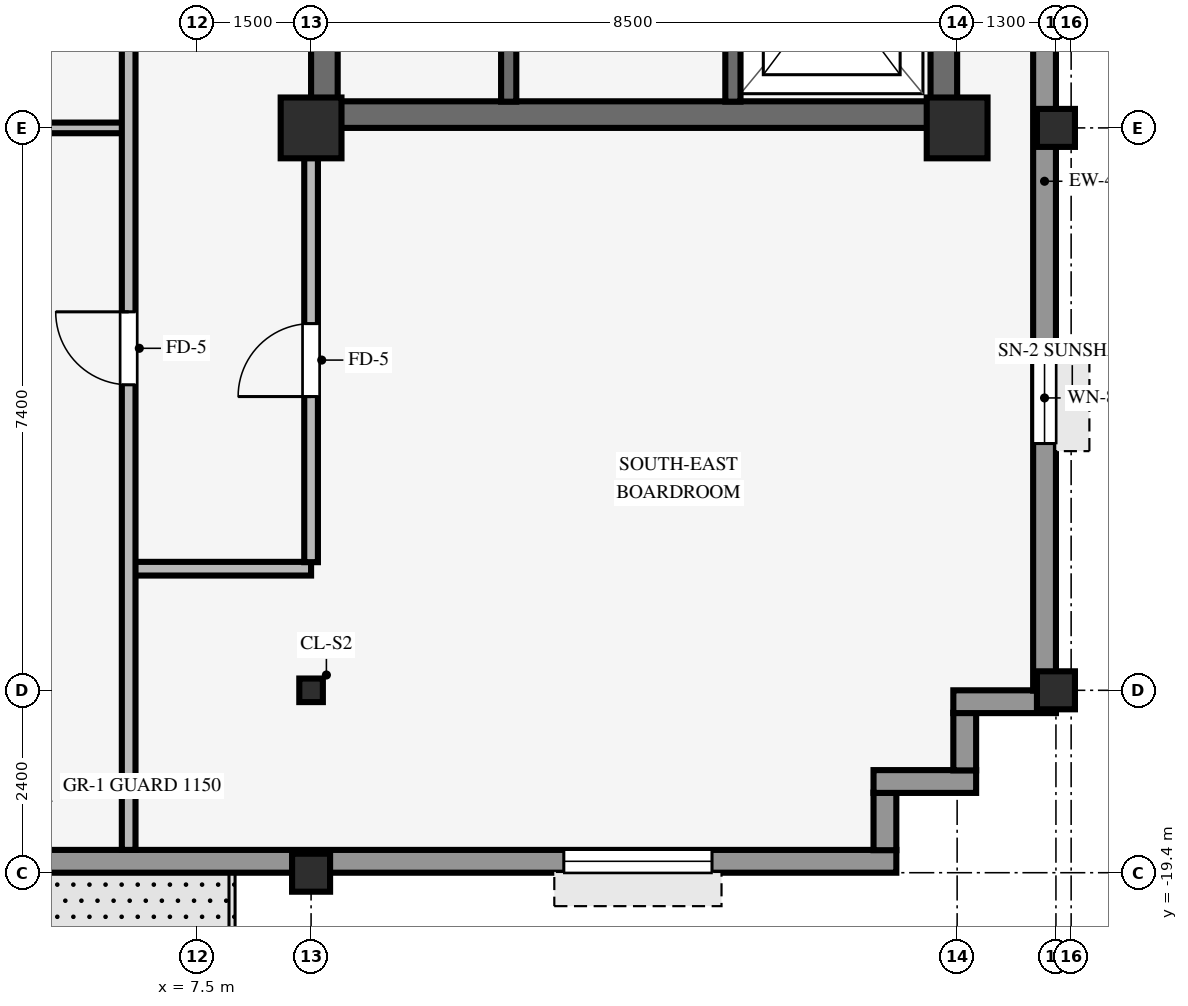
"""IFC4 building model, lengths in metres.
Left out: names, types, materials, properties, quantities, classifications, styles, units other than length and angle.
Written with IfcOpenShell. Run it as: python <this file> out.ifc"""

import sys

from ifc_helpers import new_model, si_unit, direction, frame, frame_2d, origin, origin_2d, place, context, subcontext, project, spatial, rectangle, hollow_rectangle, i_section, extrude, source, transform, mapped, element, fill, save


model = new_model("IFC4")
c1 = context("Model", 3, precision=1e-05, world=origin(), true_north=direction((0.0, 1.0)))
c2 = subcontext(c1, "Body", "Model", "MODEL_VIEW")
j1 = project(units=[si_unit("LENGTHUNIT", "METRE"), si_unit("PLANEANGLEUNIT", "RADIAN")], contexts=[c1])
p1 = place(None, origin())
s1 = spatial("IfcSite", under=j1, at=p1, CompositionType="ELEMENT")
p2 = place(p1, origin())
s2 = spatial("IfcBuilding", under=s1, at=p2, CompositionType="ELEMENT")
p3 = place(p2, frame((0.0, 0.0, 245.65)))
s3 = spatial("IfcBuildingStorey", under=s2, at=p3, CompositionType="ELEMENT", Elevation=245.65)
p4 = place(p3, frame((9.0, -9.425, 0.0), z_axis=(0.0, 0.0, 1.0), x_axis=(1.0, 0.0, 0.0)))
e1 = element("IfcWall", 1, at=p4, inside=s3, PredefinedType="SHEAR", context=c2, shape_type="SweptSolid", body=[
    extrude(rectangle(XDim=8.5, YDim=0.35, at=frame_2d((4.25, 0.0))), origin(), (0.0, 0.0, 1.0), 3.37),
])
p5 = place(p3, frame((9.175, -9.255, 0.0), z_axis=(0.0, 0.0, 1.0), x_axis=(0.0, 1.0, 0.0)))
e2 = element("IfcWall", 2, at=p5, inside=s3, PredefinedType="SHEAR", context=c2, shape_type="SweptSolid", body=[
    extrude(rectangle(XDim=18.51, YDim=0.35, at=frame_2d((9.255, 0.0))), origin(), (0.0, 0.0, 1.0), 3.37),
])
p6 = place(p5, frame((8.655, 0.0, 0.0)))
e3 = element("IfcOpeningElement", 3, at=p6, cuts=e2, PredefinedType="OPENING", context=c2, shape_type="SweptSolid", body=[
    extrude(rectangle(XDim=1.2, YDim=2.15, at=frame_2d((0.6, 1.075))), frame((0.0, 0.185, 0.0), z_axis=(0.0, -1.0, 0.0), x_axis=(1.0, 0.0, 0.0)), (0.0, 0.0, 1.0), 0.37),
])
p7 = place(p3, frame((17.325, -9.255, 0.0), z_axis=(0.0, 0.0, 1.0), x_axis=(0.0, 1.0, 0.0)))
e4 = element("IfcWall", 4, at=p7, inside=s3, PredefinedType="SHEAR", context=c2, shape_type="SweptSolid", body=[
    extrude(rectangle(XDim=18.51, YDim=0.35, at=frame_2d((9.255, 0.0))), origin(), (0.0, 0.0, 1.0), 3.37),
])
for number, where, z_axis, x_axis in (
    (5, (9.0, -9.6, 0.0), (0.0, 0.0, 1.0), (1.0, 0.0, 0.0)),
    (6, (17.5, -9.6, 0.0), (0.0, 0.0, 1.0), (1.0, 0.0, 0.0)),
):
    element("IfcColumn", number, at=place(p3, frame(where, z_axis=z_axis, x_axis=x_axis)), inside=s3, PredefinedType="COLUMN", context=c2, shape_type="SweptSolid", body=[
        extrude(rectangle(XDim=0.8, YDim=0.8, at=origin_2d()), origin(), (0.0, 0.0, 1.0), 3.37),
    ])
for number, where, z_axis, x_axis in (
    (7, (18.8, -17.0, 0.0), (0.0, 0.0, 1.0), (1.0, 0.0, 0.0)),
    (8, (18.8, -9.6, 0.0), (0.0, 0.0, 1.0), (1.0, 0.0, 0.0)),
    (9, (9.0, -19.4, 0.0), (0.0, 0.0, 1.0), (1.0, 0.0, 0.0)),
):
    element("IfcColumn", number, at=place(p3, frame(where, z_axis=z_axis, x_axis=x_axis)), inside=s3, PredefinedType="COLUMN", context=c2, shape_type="SweptSolid", body=[
        extrude(hollow_rectangle(XDim=0.5, YDim=0.5, WallThickness=0.032, InnerFilletRadius=0.032, OuterFilletRadius=0.064, at=origin_2d()), origin(), (0.0, 0.0, 1.0), 3.37),
    ])
p8 = place(p3, frame((9.0, -17.0, 0.0), z_axis=(0.0, 0.0, 1.0), x_axis=(1.0, 0.0, 0.0)))
e10 = element("IfcColumn", 10, at=p8, inside=s3, PredefinedType="COLUMN", context=c2, shape_type="SweptSolid", body=[
    extrude(i_section(OverallWidth=0.31, OverallDepth=0.31, WebThickness=0.015, FlangeThickness=0.015, FilletRadius=0.015, at=origin_2d()), origin(), (0.0, 0.0, 1.0), 3.37),
])
p9 = place(p3, frame((-18.9, -19.25, 0.0), z_axis=(0.0, 0.0, 1.0), x_axis=(1.0, 0.0, 0.0)))
e11 = element("IfcWall", 11, at=p9, inside=s3, PredefinedType="STANDARD", context=c2, shape_type="SweptSolid", body=[
    extrude(rectangle(XDim=35.6, YDim=0.3, at=frame_2d((17.8, 0.0))), origin(), (0.0, 0.0, 1.0), 2.705),
])
p10 = place(p9, frame((24.15, 0.0, 0.0), z_axis=(0.0, 0.0, 1.0), x_axis=(-1.0, 0.0, 0.0)))
e12 = element("IfcOpeningElement", 12, at=p10, cuts=e11, PredefinedType="OPENING", context=c2, shape_type="SweptSolid", body=[
    extrude(rectangle(XDim=1.05, YDim=2.1, at=frame_2d((0.525, 1.05))), frame((0.0, 0.16, 0.0), z_axis=(0.0, -1.0, 0.0), x_axis=(1.0, 0.0, 0.0)), (0.0, 0.0, 1.0), 0.32),
])
p11 = place(p9, frame((2.425, 0.0, 0.8)))
e13 = element("IfcOpeningElement", 13, at=p11, cuts=e11, PredefinedType="OPENING", context=c2, shape_type="SweptSolid", body=[
    extrude(rectangle(XDim=1.95, YDim=1.48, at=frame_2d((0.975, 0.74))), frame((0.0, 0.16, 0.0), z_axis=(0.0, -1.0, 0.0), x_axis=(1.0, 0.0, 0.0)), (0.0, 0.0, 1.0), 0.32),
])
p12 = place(p9, frame((7.225, 0.0, 0.8)))
e14 = element("IfcOpeningElement", 14, at=p12, cuts=e11, PredefinedType="OPENING", context=c2, shape_type="SweptSolid", body=[
    extrude(rectangle(XDim=1.95, YDim=1.48, at=frame_2d((0.975, 0.74))), frame((0.0, 0.16, 0.0), z_axis=(0.0, -1.0, 0.0), x_axis=(1.0, 0.0, 0.0)), (0.0, 0.0, 1.0), 0.32),
])
p13 = place(p9, frame((12.925, 0.0, 0.8)))
e15 = element("IfcOpeningElement", 15, at=p13, cuts=e11, PredefinedType="OPENING", context=c2, shape_type="SweptSolid", body=[
    extrude(rectangle(XDim=1.95, YDim=1.48, at=frame_2d((0.975, 0.74))), frame((0.0, 0.16, 0.0), z_axis=(0.0, -1.0, 0.0), x_axis=(1.0, 0.0, 0.0)), (0.0, 0.0, 1.0), 0.32),
])
p14 = place(p9, frame((15.925, 0.0, 0.8)))
e16 = element("IfcOpeningElement", 16, at=p14, cuts=e11, PredefinedType="OPENING", context=c2, shape_type="SweptSolid", body=[
    extrude(rectangle(XDim=1.95, YDim=1.48, at=frame_2d((0.975, 0.74))), frame((0.0, 0.16, 0.0), z_axis=(0.0, -1.0, 0.0), x_axis=(1.0, 0.0, 0.0)), (0.0, 0.0, 1.0), 0.32),
])
p15 = place(p9, frame((20.725, 0.0, 0.8)))
e17 = element("IfcOpeningElement", 17, at=p15, cuts=e11, PredefinedType="OPENING", context=c2, shape_type="SweptSolid", body=[
    extrude(rectangle(XDim=1.95, YDim=1.48, at=frame_2d((0.975, 0.74))), frame((0.0, 0.16, 0.0), z_axis=(0.0, -1.0, 0.0), x_axis=(1.0, 0.0, 0.0)), (0.0, 0.0, 1.0), 0.32),
])
p16 = place(p9, frame((31.225, 0.0, 0.8)))
e18 = element("IfcOpeningElement", 18, at=p16, cuts=e11, PredefinedType="OPENING", context=c2, shape_type="SweptSolid", body=[
    extrude(rectangle(XDim=1.95, YDim=1.48, at=frame_2d((0.975, 0.74))), frame((0.0, 0.16, 0.0), z_axis=(0.0, -1.0, 0.0), x_axis=(1.0, 0.0, 0.0)), (0.0, 0.0, 1.0), 0.32),
])
p17 = place(p3, frame((16.55, -19.104, 0.0), z_axis=(0.0, 0.0, 1.0), x_axis=(0.0, 1.0, 0.0)))
e19 = element("IfcWall", 19, at=p17, inside=s3, PredefinedType="STANDARD", context=c2, shape_type="SweptSolid", body=[
    extrude(rectangle(XDim=0.758, YDim=0.3, at=frame_2d((0.379, 0.0))), origin(), (0.0, 0.0, 1.0), 2.892),
])
p18 = place(p3, frame((16.4, -18.2, 0.0), z_axis=(0.0, 0.0, 1.0), x_axis=(1.0, 0.0, 0.0)))
e20 = element("IfcWall", 20, at=p18, inside=s3, PredefinedType="STANDARD", context=c2, shape_type="SweptSolid", body=[
    extrude(rectangle(XDim=1.35, YDim=0.3, at=frame_2d((0.675, 0.0))), origin(), (0.0, 0.0, 1.0), 2.892),
])
p19 = place(p3, frame((17.6, -18.054, 0.0), z_axis=(0.0, 0.0, 1.0), x_axis=(0.0, 1.0, 0.0)))
e21 = element("IfcWall", 21, at=p19, inside=s3, PredefinedType="STANDARD", context=c2, shape_type="SweptSolid", body=[
    extrude(rectangle(XDim=0.758, YDim=0.3, at=frame_2d((0.379, 0.0))), origin(), (0.0, 0.0, 1.0), 2.892),
])
p20 = place(p3, frame((17.45, -17.15, 0.0), z_axis=(0.0, 0.0, 1.0), x_axis=(1.0, 0.0, 0.0)))
e22 = element("IfcWall", 22, at=p20, inside=s3, PredefinedType="STANDARD", context=c2, shape_type="SweptSolid", body=[
    extrude(rectangle(XDim=1.35, YDim=0.3, at=frame_2d((0.675, 0.0))), origin(), (0.0, 0.0, 1.0), 2.892),
])
p21 = place(p3, frame((18.65, -17.004, 0.0), z_axis=(0.0, 0.0, 1.0), x_axis=(0.0, 1.0, 0.0)))
e23 = element("IfcWall", 23, at=p21, inside=s3, PredefinedType="STANDARD", context=c2, shape_type="SweptSolid", body=[
    extrude(rectangle(XDim=13.404, YDim=0.3, at=frame_2d((6.702, 0.0))), origin(), (0.0, 0.0, 1.0), 2.705),
])
p22 = place(p21, frame((3.251, 0.0, 0.8)))
e24 = element("IfcOpeningElement", 24, at=p22, cuts=e23, PredefinedType="OPENING", context=c2, shape_type="SweptSolid", body=[
    extrude(rectangle(XDim=1.2, YDim=1.48, at=frame_2d((0.6, 0.74))), frame((0.0, 0.16, 0.0), z_axis=(0.0, -1.0, 0.0), x_axis=(1.0, 0.0, 0.0)), (0.0, 0.0, 1.0), 0.32),
])
p23 = place(p3, frame((14.55, -9.255, 0.0), z_axis=(0.0, 0.0, 1.0), x_axis=(0.0, 1.0, 0.0)))
e25 = element("IfcWall", 25, at=p23, inside=s3, PredefinedType="SHEAR", context=c2, shape_type="SweptSolid", body=[
    extrude(rectangle(XDim=10.16, YDim=0.2, at=frame_2d((5.08, 0.0))), origin(), (0.0, 0.0, 1.0), 3.37),
])
p24 = place(p23, frame((6.615, 0.0, 0.0)))
e26 = element("IfcOpeningElement", 26, at=p24, cuts=e25, PredefinedType="OPENING", context=c2, shape_type="SweptSolid", body=[
    extrude(rectangle(XDim=0.88, YDim=2.1, at=frame_2d((0.44, 1.05))), frame((0.0, 0.11, 0.0), z_axis=(0.0, -1.0, 0.0), x_axis=(1.0, 0.0, 0.0)), (0.0, 0.0, 1.0), 0.22),
])
p25 = place(p23, frame((0.98, 0.0, 0.0)))
e27 = element("IfcOpeningElement", 27, at=p25, cuts=e25, PredefinedType="OPENING", context=c2, shape_type="SweptSolid", body=[
    extrude(rectangle(XDim=1.15, YDim=2.15, at=frame_2d((0.575, 1.075))), frame((0.0, 0.11, 0.0), z_axis=(0.0, -1.0, 0.0), x_axis=(1.0, 0.0, 0.0)), (0.0, 0.0, 1.0), 0.22),
])
p26 = place(p3, frame((11.6, -9.255, 0.0), z_axis=(0.0, 0.0, 1.0), x_axis=(0.0, 1.0, 0.0)))
e28 = element("IfcWall", 28, at=p26, inside=s3, PredefinedType="SHEAR", context=c2, shape_type="SweptSolid", body=[
    extrude(rectangle(XDim=8.025, YDim=0.2, at=frame_2d((4.012, 0.0))), origin(), (0.0, 0.0, 1.0), 3.37),
])
p27 = place(p26, frame((5.615, 0.0, 0.0)))
e29 = element("IfcOpeningElement", 29, at=p27, cuts=e28, PredefinedType="OPENING", context=c2, shape_type="SweptSolid", body=[
    extrude(rectangle(XDim=0.88, YDim=2.1, at=frame_2d((0.44, 1.05))), frame((0.0, 0.11, 0.0), z_axis=(0.0, -1.0, 0.0), x_axis=(1.0, 0.0, 0.0)), (0.0, 0.0, 1.0), 0.22),
])
p28 = place(p3, frame((6.666, -15.4, 0.0), z_axis=(0.0, 0.0, 1.0), x_axis=(1.0, 0.0, 0.0)))
e30 = element("IfcWall", 30, at=p28, inside=s3, PredefinedType="PARTITIONING", context=c2, shape_type="SweptSolid", body=[
    extrude(rectangle(XDim=2.334, YDim=0.18, at=frame_2d((1.167, 0.0))), origin(), (0.0, 0.0, 1.0), 3.36),
])
p29 = place(p3, frame((0.151, -9.6, 0.0), z_axis=(0.0, 0.0, 1.0), x_axis=(1.0, 0.0, 0.0)))
e31 = element("IfcWall", 31, at=p29, inside=s3, PredefinedType="PARTITIONING", context=c2, shape_type="SweptSolid", body=[
    extrude(rectangle(XDim=6.383, YDim=0.14, at=frame_2d((3.191, 0.0))), origin(), (0.0, 0.0, 1.0), 2.405),
])
p30 = place(p3, frame((6.6, -19.1, 0.0), z_axis=(0.0, 0.0, 1.0), x_axis=(0.0, 1.0, 0.0)))
e32 = element("IfcWall", 32, at=p30, inside=s3, PredefinedType="PARTITIONING", context=c2, shape_type="SweptSolid", body=[
    extrude(rectangle(XDim=17.764, YDim=0.18, at=frame_2d((8.882, 0.0))), origin(), (0.0, 0.0, 1.0), 3.36),
])
p31 = place(p30, frame((6.12, 0.0, 0.0)))
e33 = element("IfcOpeningElement", 33, at=p31, cuts=e32, PredefinedType="OPENING", context=c2, shape_type="SweptSolid", body=[
    extrude(rectangle(XDim=0.96, YDim=2.1, at=frame_2d((0.48, 1.05))), frame((0.0, 0.1, 0.0), z_axis=(0.0, -1.0, 0.0), x_axis=(1.0, 0.0, 0.0)), (0.0, 0.0, 1.0), 0.2),
])
p32 = place(p3, frame((9.0, -15.314, 0.0), z_axis=(0.0, 0.0, 1.0), x_axis=(0.0, 1.0, 0.0)))
e34 = element("IfcWall", 34, at=p32, inside=s3, PredefinedType="PARTITIONING", context=c2, shape_type="SweptSolid", body=[
    extrude(rectangle(XDim=5.318, YDim=0.18, at=frame_2d((2.659, 0.0))), origin(), (0.0, 0.0, 1.0), 2.892),
])
p33 = place(p32, frame((2.179, 0.0, 0.0)))
e35 = element("IfcOpeningElement", 35, at=p33, cuts=e34, PredefinedType="OPENING", context=c2, shape_type="SweptSolid", body=[
    extrude(rectangle(XDim=0.96, YDim=2.1, at=frame_2d((0.48, 1.05))), frame((0.0, 0.1, 0.0), z_axis=(0.0, -1.0, 0.0), x_axis=(1.0, 0.0, 0.0)), (0.0, 0.0, 1.0), 0.2),
])
m1 = source(origin(), c2, "Body", "SweptSolid", [
    extrude(rectangle(XDim=1.95, YDim=1.48, at=frame_2d((0.975, 0.74))), frame((0.0, 0.03, 0.0), z_axis=(0.0, -1.0, 0.0), x_axis=(1.0, 0.0, 0.0)), (0.0, 0.0, 1.0), 0.06),
])
p34 = place(p16, origin())
e36 = element("IfcWindow", 36, at=p34, inside=s3, PartitioningType="SINGLE_PANEL", PredefinedType="WINDOW", context=c2, shape_type="MappedRepresentation", body=[
    mapped(m1, transform((0.0, 0.0, 0.0), scale=1.0)),
])
fill(e18, e36)
m2 = source(origin(), c2, "Body", "SweptSolid", [
    extrude(rectangle(XDim=1.2, YDim=1.48, at=frame_2d((0.6, 0.74))), frame((0.0, 0.03, 0.0), z_axis=(0.0, -1.0, 0.0), x_axis=(1.0, 0.0, 0.0)), (0.0, 0.0, 1.0), 0.06),
])
p35 = place(p22, origin())
e37 = element("IfcWindow", 37, at=p35, inside=s3, PartitioningType="SINGLE_PANEL", PredefinedType="WINDOW", context=c2, shape_type="MappedRepresentation", body=[
    mapped(m2, transform((0.0, 0.0, 0.0), scale=1.0)),
])
fill(e24, e37)
m3 = source(origin(), c2, "Body", "SweptSolid", [
    extrude(rectangle(XDim=0.96, YDim=2.1, at=frame_2d((0.48, 1.05))), frame((0.0, 0.025, 0.0), z_axis=(0.0, -1.0, 0.0), x_axis=(1.0, 0.0, 0.0)), (0.0, 0.0, 1.0), 0.05),
])
p36 = place(p31, origin())
e38 = element("IfcDoor", 38, at=p36, inside=s3, OperationType="SINGLE_SWING_RIGHT", PredefinedType="DOOR", context=c2, shape_type="MappedRepresentation", body=[
    mapped(m3, transform((0.0, 0.0, 0.0), scale=1.0)),
])
fill(e33, e38)
p37 = place(p33, origin())
e39 = element("IfcDoor", 39, at=p37, inside=s3, OperationType="SINGLE_SWING_LEFT", PredefinedType="DOOR", context=c2, shape_type="MappedRepresentation", body=[
    mapped(m3, transform((0.0, 0.0, 0.0), scale=1.0)),
])
fill(e35, e39)
save(model, sys.argv[1])
